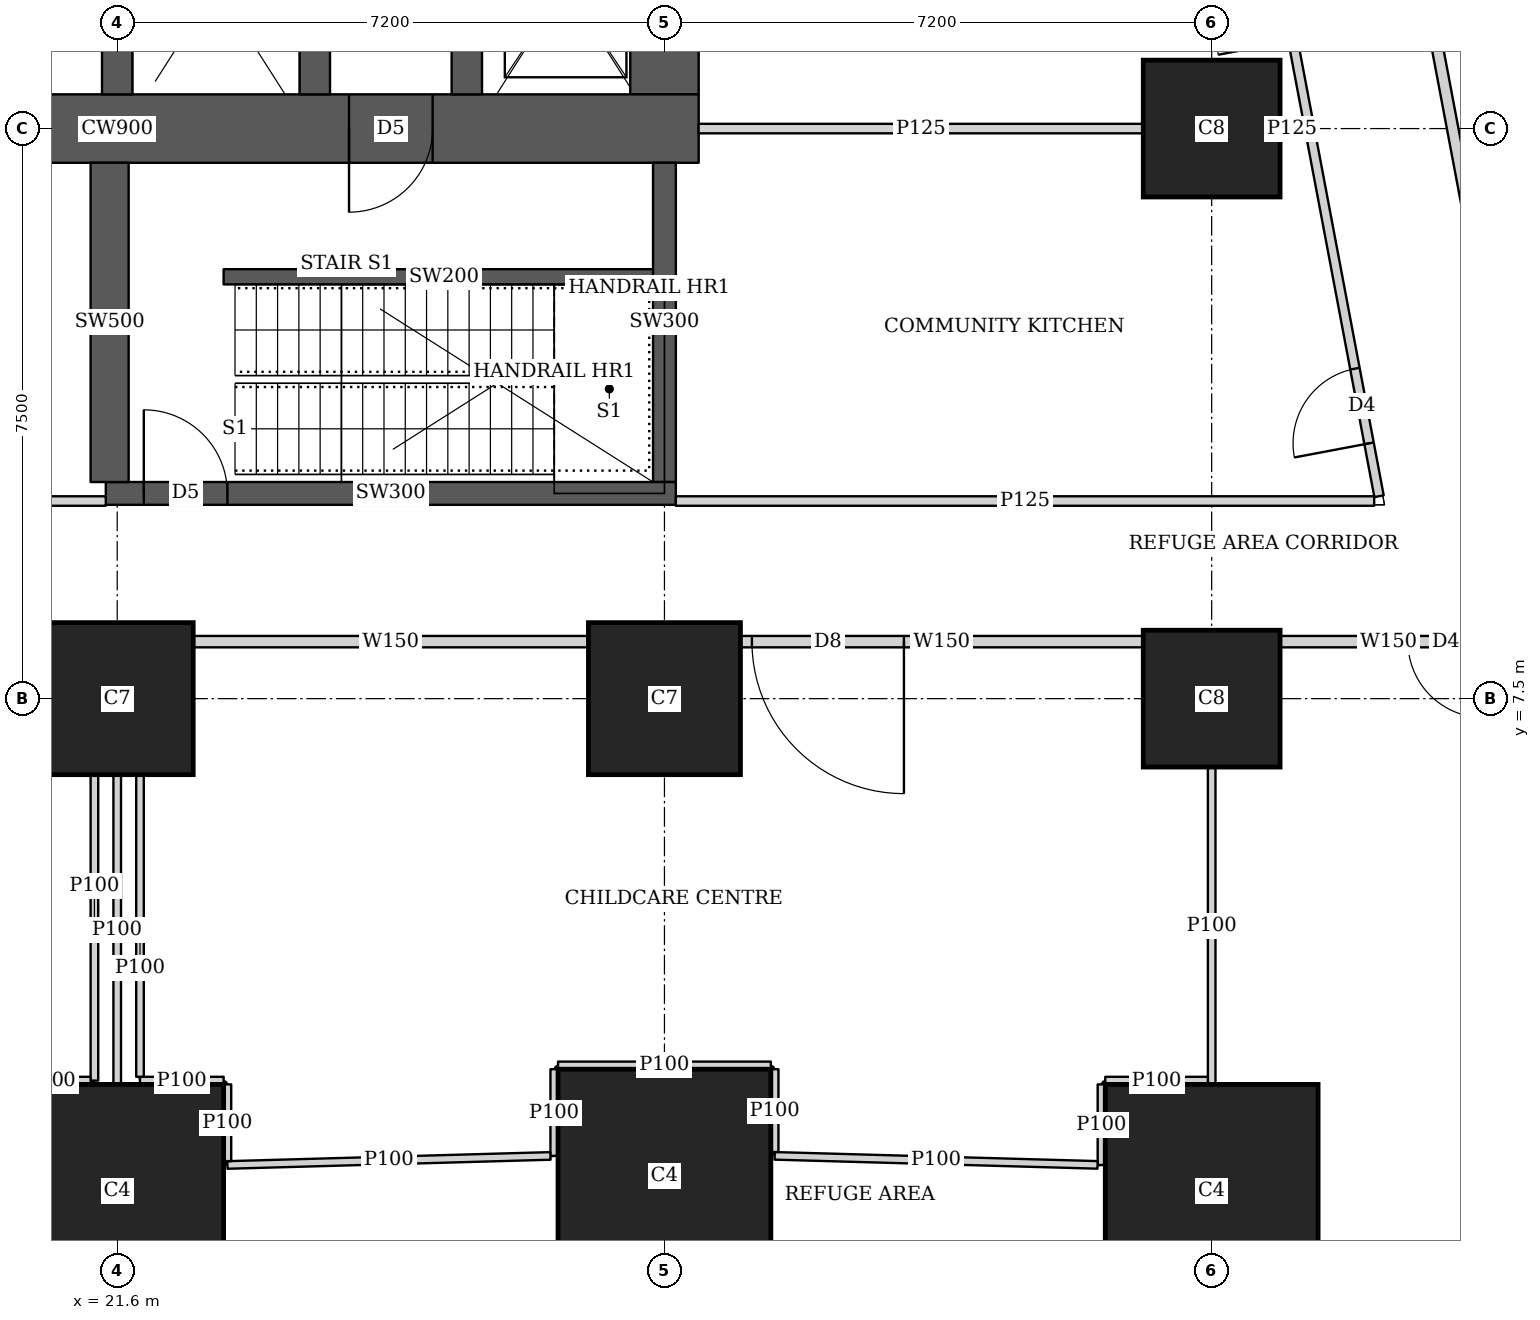
"""IFC4 building model, lengths in metres.
Left out: names, types, materials, properties, quantities, classifications, styles, units other than length and angle.
Written with IfcOpenShell. Run it as: python <this file> out.ifc"""

import sys

from ifc_helpers import new_model, si_unit, direction, frame, frame_2d, origin, origin_2d, place, context, subcontext, project, spatial, rectangle, extrude, element, fill, save


model = new_model("IFC4")
c1 = context("Model", 3, precision=1e-05, world=origin(), true_north=direction((0.0, 1.0)))
c2 = subcontext(c1, "Body", "Model", "MODEL_VIEW")
j1 = project(units=[si_unit("LENGTHUNIT", "METRE"), si_unit("PLANEANGLEUNIT", "RADIAN")], contexts=[c1])
p1 = place(None, origin())
s1 = spatial("IfcSite", under=j1, at=p1, CompositionType="ELEMENT")
p2 = place(p1, origin())
s2 = spatial("IfcBuilding", under=s1, at=p2, CompositionType="ELEMENT")
p3 = place(p2, frame((0.0, 0.0, 72.5)))
s3 = spatial("IfcBuildingStorey", under=s2, at=p3, CompositionType="ELEMENT", Elevation=72.5)
for number, where, z_axis, x_axis in (
    (1, (21.6, 1.025, 0.0), (0.0, 0.0, 1.0), (1.0, 0.0, 0.0)),
    (2, (28.8, 1.225, 0.0), (0.0, 0.0, 1.0), (1.0, 0.0, 0.0)),
    (3, (36.0, 1.025, 0.0), (0.0, 0.0, 1.0), (1.0, 0.0, 0.0)),
):
    element("IfcColumn", number, at=place(p3, frame(where, z_axis=z_axis, x_axis=x_axis)), inside=s3, PredefinedType="COLUMN", context=c2, shape_type="SweptSolid", body=[
        extrude(rectangle(XDim=2.8, YDim=2.8, at=origin_2d()), origin(), (0.0, 0.0, 1.0), 5.4),
    ])
for number, where, z_axis, x_axis in (
    (4, (21.6, 7.5, 0.0), (0.0, 0.0, 1.0), (1.0, 0.0, 0.0)),
    (5, (28.8, 7.5, 0.0), (0.0, 0.0, 1.0), (1.0, 0.0, 0.0)),
):
    element("IfcColumn", number, at=place(p3, frame(where, z_axis=z_axis, x_axis=x_axis)), inside=s3, PredefinedType="COLUMN", context=c2, shape_type="SweptSolid", body=[
        extrude(rectangle(XDim=2.0, YDim=2.0, at=origin_2d()), origin(), (0.0, 0.0, 1.0), 5.4),
    ])
for number, where, z_axis, x_axis in (
    (6, (36.0, 7.5, 0.0), (0.0, 0.0, 1.0), (1.0, 0.0, 0.0)),
    (7, (36.0, 15.0, 0.0), (0.0, 0.0, 1.0), (1.0, 0.0, 0.0)),
):
    element("IfcColumn", number, at=place(p3, frame(where, z_axis=z_axis, x_axis=x_axis)), inside=s3, PredefinedType="COLUMN", context=c2, shape_type="SweptSolid", body=[
        extrude(rectangle(XDim=1.8, YDim=1.8, at=origin_2d()), origin(), (0.0, 0.0, 1.0), 5.4),
    ])
p4 = place(p3, frame((13.95, 15.0, 0.0), z_axis=(0.0, 0.0, 1.0), x_axis=(1.0, 0.0, 0.0)))
e8 = element("IfcWall", 8, at=p4, inside=s3, PredefinedType="SHEAR", context=c2, shape_type="SweptSolid", body=[
    extrude(rectangle(XDim=15.3, YDim=0.9, at=frame_2d((7.65, 0.0))), origin(), (0.0, 0.0, 1.0), 5.4),
])
p5 = place(p4, frame((4.45, 0.0, 0.0)))
e9 = element("IfcOpeningElement", 9, at=p5, cuts=e8, PredefinedType="OPENING", context=c2, shape_type="SweptSolid", body=[
    extrude(rectangle(XDim=1.8, YDim=2.1, at=frame_2d((0.9, 1.05))), frame((0.0, 0.46, 0.0), z_axis=(0.0, -1.0, 0.0), x_axis=(1.0, 0.0, 0.0)), (0.0, 0.0, 1.0), 0.92),
])
p6 = place(p4, frame((10.7, 0.0, 0.0)))
e10 = element("IfcOpeningElement", 10, at=p6, cuts=e8, PredefinedType="OPENING", context=c2, shape_type="SweptSolid", body=[
    extrude(rectangle(XDim=1.1, YDim=2.1, at=frame_2d((0.55, 1.05))), frame((0.0, 0.46, 0.0), z_axis=(0.0, -1.0, 0.0), x_axis=(1.0, 0.0, 0.0)), (0.0, 0.0, 1.0), 0.92),
])
p7 = place(p3, frame((28.8, 15.45, 0.0), z_axis=(0.0, 0.0, 1.0), x_axis=(0.0, 1.0, 0.0)))
e11 = element("IfcWall", 11, at=p7, inside=s3, PredefinedType="SHEAR", context=c2, shape_type="SweptSolid", body=[
    extrude(rectangle(XDim=14.1, YDim=0.9, at=frame_2d((7.05, 0.0))), origin(), (0.0, 0.0, 1.0), 5.4),
])
for number, where, z_axis, x_axis in (
    (12, (21.6, 15.45, 0.0), (0.0, 0.0, 1.0), (0.0, 1.0, 0.0)),
    (13, (24.2, 15.45, 0.0), (0.0, 0.0, 1.0), (0.0, 1.0, 0.0)),
):
    element("IfcWall", number, at=place(p3, frame(where, z_axis=z_axis, x_axis=x_axis)), inside=s3, PredefinedType="SHEAR", context=c2, shape_type="SweptSolid", body=[
        extrude(rectangle(XDim=14.1, YDim=0.4, at=frame_2d((7.05, 0.0))), origin(), (0.0, 0.0, 1.0), 5.4),
    ])
p8 = place(p3, frame((26.2, 15.45, 0.0), z_axis=(0.0, 0.0, 1.0), x_axis=(0.0, 1.0, 0.0)))
e14 = element("IfcWall", 14, at=p8, inside=s3, PredefinedType="SHEAR", context=c2, shape_type="SweptSolid", body=[
    extrude(rectangle(XDim=3.1, YDim=0.4, at=frame_2d((1.55, 0.0))), origin(), (0.0, 0.0, 1.0), 5.4),
])
p9 = place(p8, frame((0.825, 0.0, 0.0)))
e15 = element("IfcOpeningElement", 15, at=p9, cuts=e14, PredefinedType="OPENING", context=c2, shape_type="SweptSolid", body=[
    extrude(rectangle(XDim=1.2, YDim=2.1, at=frame_2d((0.6, 1.05))), frame((0.0, 0.21, 0.0), z_axis=(0.0, -1.0, 0.0), x_axis=(1.0, 0.0, 0.0)), (0.0, 0.0, 1.0), 0.42),
])
p10 = place(p3, frame((21.45, 10.2, 0.0), z_axis=(0.0, 0.0, 1.0), x_axis=(1.0, 0.0, 0.0)))
e16 = element("IfcWall", 16, at=p10, inside=s3, PredefinedType="SHEAR", context=c2, shape_type="SweptSolid", body=[
    extrude(rectangle(XDim=7.5, YDim=0.3, at=frame_2d((3.75, 0.0))), origin(), (0.0, 0.0, 1.0), 5.4),
])
p11 = place(p10, frame((0.5, 0.0, 0.0)))
e17 = element("IfcOpeningElement", 17, at=p11, cuts=e16, PredefinedType="OPENING", context=c2, shape_type="SweptSolid", body=[
    extrude(rectangle(XDim=1.1, YDim=2.1, at=frame_2d((0.55, 1.05))), frame((0.0, 0.16, 0.0), z_axis=(0.0, -1.0, 0.0), x_axis=(1.0, 0.0, 0.0)), (0.0, 0.0, 1.0), 0.32),
])
p12 = place(p3, frame((21.5, 10.35, 0.0), z_axis=(0.0, 0.0, 1.0), x_axis=(0.0, 1.0, 0.0)))
e18 = element("IfcWall", 18, at=p12, inside=s3, PredefinedType="SHEAR", context=c2, shape_type="SweptSolid", body=[
    extrude(rectangle(XDim=4.2, YDim=0.5, at=frame_2d((2.1, 0.0))), origin(), (0.0, 0.0, 1.0), 5.4),
])
p13 = place(p3, frame((28.8, 10.35, 0.0), z_axis=(0.0, 0.0, 1.0), x_axis=(0.0, 1.0, 0.0)))
e19 = element("IfcWall", 19, at=p13, inside=s3, PredefinedType="SHEAR", context=c2, shape_type="SweptSolid", body=[
    extrude(rectangle(XDim=4.2, YDim=0.3, at=frame_2d((2.1, 0.0))), origin(), (0.0, 0.0, 1.0), 5.4),
])
p14 = place(p3, frame((40.355, 8.25, 0.0), z_axis=(0.0, 0.0, 1.0), x_axis=(-1.0, 0.0, 0.0)))
e20 = element("IfcWall", 20, at=p14, inside=s3, PredefinedType="SOLIDWALL", context=c2, shape_type="SweptSolid", body=[
    extrude(rectangle(XDim=3.454, YDim=0.15, at=frame_2d((1.727, 0.0))), origin(), (0.0, 0.0, 1.0), 3.55),
])
p15 = place(p14, frame((0.773, 0.0, 0.0)))
e21 = element("IfcOpeningElement", 21, at=p15, cuts=e20, PredefinedType="OPENING", context=c2, shape_type="SweptSolid", body=[
    extrude(rectangle(XDim=1.0, YDim=2.1, at=frame_2d((0.5, 1.05))), frame((0.0, 0.085, 0.0), z_axis=(0.0, -1.0, 0.0), x_axis=(1.0, 0.0, 0.0)), (0.0, 0.0, 1.0), 0.17),
])
p16 = place(p3, frame((35.099, 8.25, 0.0), z_axis=(0.0, 0.0, 1.0), x_axis=(-1.0, 0.0, 0.0)))
e22 = element("IfcWall", 22, at=p16, inside=s3, PredefinedType="SOLIDWALL", context=c2, shape_type="SweptSolid", body=[
    extrude(rectangle(XDim=5.298, YDim=0.15, at=frame_2d((2.649, 0.0))), origin(), (0.0, 0.0, 1.0), 3.15),
])
p17 = place(p16, frame((3.148, 0.0, 0.0)))
e23 = element("IfcOpeningElement", 23, at=p17, cuts=e22, PredefinedType="OPENING", context=c2, shape_type="SweptSolid", body=[
    extrude(rectangle(XDim=2.0, YDim=2.1, at=frame_2d((1.0, 1.05))), frame((0.0, 0.085, 0.0), z_axis=(0.0, -1.0, 0.0), x_axis=(1.0, 0.0, 0.0)), (0.0, 0.0, 1.0), 0.17),
])
p18 = place(p3, frame((27.799, 8.25, 0.0), z_axis=(0.0, 0.0, 1.0), x_axis=(-1.0, 0.0, 0.0)))
e24 = element("IfcWall", 24, at=p18, inside=s3, PredefinedType="SOLIDWALL", context=c2, shape_type="SweptSolid", body=[
    extrude(rectangle(XDim=5.198, YDim=0.15, at=frame_2d((2.599, 0.0))), origin(), (0.0, 0.0, 1.0), 3.15),
])
p19 = place(p3, frame((35.094, 36.585, 0.0), z_axis=(0.0, 0.0, 1.0), x_axis=(0.185591455861, -0.982626995106, 0.0)))
e25 = element("IfcWall", 25, at=p19, inside=s3, PredefinedType="SOLIDWALL", context=c2, shape_type="SweptSolid", body=[
    extrude(rectangle(XDim=35.735, YDim=0.15, at=frame_2d((17.867, 0.0))), origin(), (0.0, 0.0, 1.0), 3.35),
])
p20 = place(p19, frame((15.15, 0.0, 0.0)))
e26 = element("IfcOpeningElement", 26, at=p20, cuts=e25, PredefinedType="OPENING", context=c2, shape_type="SweptSolid", body=[
    extrude(rectangle(XDim=1.0, YDim=2.1, at=frame_2d((0.5, 1.05))), frame((0.0, 0.085, 0.0), z_axis=(0.0, -1.0, 0.0), x_axis=(1.0, 0.0, 0.0)), (0.0, 0.0, 1.0), 0.17),
])
p21 = place(p3, frame((21.6, 2.426, 0.0), z_axis=(0.0, 0.0, 1.0), x_axis=(0.0, 1.0, 0.0)))
e27 = element("IfcWall", 27, at=p21, inside=s3, PredefinedType="PARTITIONING", context=c2, shape_type="SweptSolid", body=[
    extrude(rectangle(XDim=4.073, YDim=0.1, at=frame_2d((2.037, 0.0))), origin(), (0.0, 0.0, 1.0), 3.55),
])
p22 = place(p3, frame((36.0, 2.426, 0.0), z_axis=(0.0, 0.0, 1.0), x_axis=(0.0, 1.0, 0.0)))
e28 = element("IfcWall", 28, at=p22, inside=s3, PredefinedType="PARTITIONING", context=c2, shape_type="SweptSolid", body=[
    extrude(rectangle(XDim=4.173, YDim=0.1, at=frame_2d((2.086, 0.0))), origin(), (0.0, 0.0, 1.0), 3.55),
])
p23 = place(p3, frame((10.163, 10.1, 0.0), z_axis=(0.0, 0.0, 1.0), x_axis=(1.0, 0.0, 0.0)))
e29 = element("IfcWall", 29, at=p23, inside=s3, PredefinedType="PARTITIONING", context=c2, shape_type="SweptSolid", body=[
    extrude(rectangle(XDim=11.287, YDim=0.125, at=frame_2d((5.644, 0.0))), origin(), (0.0, 0.0, 1.0), 3.15),
])
p24 = place(p23, frame((7.832, 0.0, 0.0)))
e30 = element("IfcOpeningElement", 30, at=p24, cuts=e29, PredefinedType="OPENING", context=c2, shape_type="SweptSolid", body=[
    extrude(rectangle(XDim=1.8, YDim=2.1, at=frame_2d((0.9, 1.05))), frame((0.0, 0.073, 0.0), z_axis=(0.0, -1.0, 0.0), x_axis=(1.0, 0.0, 0.0)), (0.0, 0.0, 1.0), 0.145),
])
p25 = place(p3, frame((28.95, 10.1, 0.0), z_axis=(0.0, 0.0, 1.0), x_axis=(1.0, 0.0, 0.0)))
e31 = element("IfcWall", 31, at=p25, inside=s3, PredefinedType="PARTITIONING", context=c2, shape_type="SweptSolid", body=[
    extrude(rectangle(XDim=9.188, YDim=0.125, at=frame_2d((4.594, 0.0))), origin(), (0.0, 0.0, 1.0), 3.15),
])
p26 = place(p3, frame((38.202, 10.163, 0.0), z_axis=(0.0, 0.0, 1.0), x_axis=(-0.185610321132, 0.982623431783, 0.0)))
e32 = element("IfcWall", 32, at=p26, inside=s3, PredefinedType="PARTITIONING", context=c2, shape_type="SweptSolid", body=[
    extrude(rectangle(XDim=25.111, YDim=0.125, at=frame_2d((12.556, 0.0))), origin(), (0.0, 0.0, 1.0), 3.55),
])
p27 = place(p26, frame((0.708, 0.0, 0.0)))
e33 = element("IfcOpeningElement", 33, at=p27, cuts=e32, PredefinedType="OPENING", context=c2, shape_type="SweptSolid", body=[
    extrude(rectangle(XDim=1.0, YDim=2.1, at=frame_2d((0.5, 1.05))), frame((0.0, 0.073, 0.0), z_axis=(0.0, -1.0, 0.0), x_axis=(1.0, 0.0, 0.0)), (0.0, 0.0, 1.0), 0.145),
])
p28 = place(p26, frame((6.1, 0.0, 0.0)))
e34 = element("IfcOpeningElement", 34, at=p28, cuts=e32, PredefinedType="OPENING", context=c2, shape_type="SweptSolid", body=[
    extrude(rectangle(XDim=1.0, YDim=2.1, at=frame_2d((0.5, 1.05))), frame((0.0, 0.073, 0.0), z_axis=(0.0, -1.0, 0.0), x_axis=(1.0, 0.0, 0.0)), (0.0, 0.0, 1.0), 0.145),
])
p29 = place(p26, frame((13.378, 0.0, 0.0)))
e35 = element("IfcOpeningElement", 35, at=p29, cuts=e32, PredefinedType="OPENING", context=c2, shape_type="SweptSolid", body=[
    extrude(rectangle(XDim=1.0, YDim=2.1, at=frame_2d((0.5, 1.05))), frame((0.0, 0.073, 0.0), z_axis=(0.0, -1.0, 0.0), x_axis=(1.0, 0.0, 0.0)), (0.0, 0.0, 1.0), 0.145),
])
p30 = place(p26, frame((21.35, 0.0, 0.0)))
e36 = element("IfcOpeningElement", 36, at=p30, cuts=e32, PredefinedType="OPENING", context=c2, shape_type="SweptSolid", body=[
    extrude(rectangle(XDim=1.0, YDim=2.1, at=frame_2d((0.5, 1.05))), frame((0.0, 0.073, 0.0), z_axis=(0.0, -1.0, 0.0), x_axis=(1.0, 0.0, 0.0)), (0.0, 0.0, 1.0), 0.145),
])
p31 = place(p3, frame((29.25, 15.0, 0.0), z_axis=(0.0, 0.0, 1.0), x_axis=(1.0, 0.0, 0.0)))
e37 = element("IfcWall", 37, at=p31, inside=s3, PredefinedType="PARTITIONING", context=c2, shape_type="SweptSolid", body=[
    extrude(rectangle(XDim=5.849, YDim=0.125, at=frame_2d((2.925, 0.0))), origin(), (0.0, 0.0, 1.0), 3.55),
])
p32 = place(p3, frame((36.901, 15.0, 0.0), z_axis=(0.0, 0.0, 1.0), x_axis=(1.0, 0.0, 0.0)))
e38 = element("IfcWall", 38, at=p32, inside=s3, PredefinedType="PARTITIONING", context=c2, shape_type="SweptSolid", body=[
    extrude(rectangle(XDim=0.312, YDim=0.125, at=frame_2d((0.156, 0.0))), origin(), (0.0, 0.0, 1.0), 3.55),
])
p33 = place(p3, frame((21.3, 6.499, 0.0), z_axis=(0.0, 0.0, 1.0), x_axis=(0.0, -1.0, 0.0)))
e39 = element("IfcWall", 39, at=p33, inside=s3, PredefinedType="PARTITIONING", context=c2, shape_type="SweptSolid", body=[
    extrude(rectangle(XDim=4.024, YDim=0.1, at=frame_2d((2.012, 0.0))), origin(), (0.0, 0.0, 1.0), 3.55),
])
p34 = place(p3, frame((21.25, 2.475, 0.0), z_axis=(0.0, 0.0, 1.0), x_axis=(-1.0, 0.0, 0.0)))
e40 = element("IfcWall", 40, at=p34, inside=s3, PredefinedType="PARTITIONING", context=c2, shape_type="SweptSolid", body=[
    extrude(rectangle(XDim=1.05, YDim=0.1, at=frame_2d((0.525, 0.0))), origin(), (0.0, 0.0, 1.0), 3.55),
])
p35 = place(p3, frame((35.95, 2.475, 0.0), z_axis=(0.0, 0.0, 1.0), x_axis=(-1.0, 0.0, 0.0)))
e41 = element("IfcWall", 41, at=p35, inside=s3, PredefinedType="PARTITIONING", context=c2, shape_type="SweptSolid", body=[
    extrude(rectangle(XDim=1.35, YDim=0.1, at=frame_2d((0.675, 0.0))), origin(), (0.0, 0.0, 1.0), 3.55),
])
p36 = place(p3, frame((34.55, 2.425, 0.0), z_axis=(0.0, 0.0, 1.0), x_axis=(0.0, -1.0, 0.0)))
e42 = element("IfcWall", 42, at=p36, inside=s3, PredefinedType="PARTITIONING", context=c2, shape_type="SweptSolid", body=[
    extrude(rectangle(XDim=1.06, YDim=0.1, at=frame_2d((0.53, 0.0))), origin(), (0.0, 0.0, 1.0), 3.35),
])
p37 = place(p3, frame((34.499, 1.366, 0.0), z_axis=(0.0, 0.0, 1.0), x_axis=(-0.999607123995, 0.028028515083, 0.0)))
e43 = element("IfcWall", 43, at=p37, inside=s3, PredefinedType="PARTITIONING", context=c2, shape_type="SweptSolid", body=[
    extrude(rectangle(XDim=4.251, YDim=0.1, at=frame_2d((2.125, 0.0))), origin(), (0.0, 0.0, 1.0), 3.35),
])
p38 = place(p3, frame((30.25, 1.535, 0.0), z_axis=(0.0, 0.0, 1.0), x_axis=(0.0, 1.0, 0.0)))
e44 = element("IfcWall", 44, at=p38, inside=s3, PredefinedType="PARTITIONING", context=c2, shape_type="SweptSolid", body=[
    extrude(rectangle(XDim=1.09, YDim=0.1, at=frame_2d((0.545, 0.0))), origin(), (0.0, 0.0, 1.0), 3.35),
])
p39 = place(p3, frame((30.2, 2.675, 0.0), z_axis=(0.0, 0.0, 1.0), x_axis=(-1.0, 0.0, 0.0)))
e45 = element("IfcWall", 45, at=p39, inside=s3, PredefinedType="PARTITIONING", context=c2, shape_type="SweptSolid", body=[
    extrude(rectangle(XDim=2.8, YDim=0.1, at=frame_2d((1.4, 0.0))), origin(), (0.0, 0.0, 1.0), 3.55),
])
p40 = place(p3, frame((27.35, 2.625, 0.0), z_axis=(0.0, 0.0, 1.0), x_axis=(0.0, -1.0, 0.0)))
e46 = element("IfcWall", 46, at=p40, inside=s3, PredefinedType="PARTITIONING", context=c2, shape_type="SweptSolid", body=[
    extrude(rectangle(XDim=1.14, YDim=0.1, at=frame_2d((0.57, 0.0))), origin(), (0.0, 0.0, 1.0), 3.35),
])
p41 = place(p3, frame((27.3, 1.484, 0.0), z_axis=(0.0, 0.0, 1.0), x_axis=(-0.999608911234, -0.027964702423, 0.0)))
e47 = element("IfcWall", 47, at=p41, inside=s3, PredefinedType="PARTITIONING", context=c2, shape_type="SweptSolid", body=[
    extrude(rectangle(XDim=4.252, YDim=0.1, at=frame_2d((2.126, 0.0))), origin(), (0.0, 0.0, 1.0), 3.35),
])
p42 = place(p3, frame((23.05, 1.416, 0.0), z_axis=(0.0, 0.0, 1.0), x_axis=(0.0, 1.0, 0.0)))
e48 = element("IfcWall", 48, at=p42, inside=s3, PredefinedType="PARTITIONING", context=c2, shape_type="SweptSolid", body=[
    extrude(rectangle(XDim=1.009, YDim=0.1, at=frame_2d((0.504, 0.0))), origin(), (0.0, 0.0, 1.0), 3.35),
])
p43 = place(p3, frame((23.0, 2.475, 0.0), z_axis=(0.0, 0.0, 1.0), x_axis=(-1.0, 0.0, 0.0)))
e49 = element("IfcWall", 49, at=p43, inside=s3, PredefinedType="PARTITIONING", context=c2, shape_type="SweptSolid", body=[
    extrude(rectangle(XDim=1.1, YDim=0.1, at=frame_2d((0.55, 0.0))), origin(), (0.0, 0.0, 1.0), 3.55),
])
p44 = place(p3, frame((21.9, 2.525, 0.0), z_axis=(0.0, 0.0, 1.0), x_axis=(0.0, 1.0, 0.0)))
e50 = element("IfcWall", 50, at=p44, inside=s3, PredefinedType="PARTITIONING", context=c2, shape_type="SweptSolid", body=[
    extrude(rectangle(XDim=3.974, YDim=0.1, at=frame_2d((1.987, 0.0))), origin(), (0.0, 0.0, 1.0), 3.55),
])
p45 = place(p3, frame((23.0, 13.05, 0.0), z_axis=(0.0, 0.0, 1.0), x_axis=(1.0, 0.0, 0.0)))
e51 = element("IfcWall", 51, at=p45, inside=s3, PredefinedType="SHEAR", context=c2, shape_type="SweptSolid", body=[
    extrude(rectangle(XDim=5.8, YDim=0.2, at=frame_2d((2.9, 0.0))), origin(), (0.0, 0.0, 1.0), 5.4),
])
p46 = place(p17, origin())
e52 = element("IfcDoor", 52, at=p46, inside=s3, OperationType="DOUBLE_DOOR_SINGLE_SWING", PredefinedType="DOOR", context=c2, shape_type="SweptSolid", body=[
    extrude(rectangle(XDim=2.0, YDim=2.1, at=frame_2d((1.0, 1.05))), frame((0.0, 0.025, 0.0), z_axis=(0.0, -1.0, 0.0), x_axis=(1.0, 0.0, 0.0)), (0.0, 0.0, 1.0), 0.05),
])
fill(e23, e52)
p47 = place(p15, origin())
e53 = element("IfcDoor", 53, at=p47, inside=s3, OperationType="SINGLE_SWING_LEFT", PredefinedType="DOOR", context=c2, shape_type="SweptSolid", body=[
    extrude(rectangle(XDim=1.0, YDim=2.1, at=frame_2d((0.5, 1.05))), frame((0.0, 0.025, 0.0), z_axis=(0.0, -1.0, 0.0), x_axis=(1.0, 0.0, 0.0)), (0.0, 0.0, 1.0), 0.05),
])
fill(e21, e53)
p48 = place(p27, origin())
e54 = element("IfcDoor", 54, at=p48, inside=s3, OperationType="SINGLE_SWING_LEFT", PredefinedType="DOOR", context=c2, shape_type="SweptSolid", body=[
    extrude(rectangle(XDim=1.0, YDim=2.1, at=frame_2d((0.5, 1.05))), frame((0.0, 0.025, 0.0), z_axis=(0.0, -1.0, 0.0), x_axis=(1.0, 0.0, 0.0)), (0.0, 0.0, 1.0), 0.05),
])
fill(e33, e54)
p49 = place(p6, origin())
e55 = element("IfcDoor", 55, at=p49, inside=s3, OperationType="SINGLE_SWING_RIGHT", PredefinedType="DOOR", context=c2, shape_type="SweptSolid", body=[
    extrude(rectangle(XDim=1.1, YDim=2.1, at=frame_2d((0.55, 1.05))), frame((0.0, 0.025, 0.0), z_axis=(0.0, -1.0, 0.0), x_axis=(1.0, 0.0, 0.0)), (0.0, 0.0, 1.0), 0.05),
])
fill(e10, e55)
p50 = place(p11, origin())
e56 = element("IfcDoor", 56, at=p50, inside=s3, OperationType="SINGLE_SWING_LEFT", PredefinedType="DOOR", context=c2, shape_type="SweptSolid", body=[
    extrude(rectangle(XDim=1.1, YDim=2.1, at=frame_2d((0.55, 1.05))), frame((0.0, 0.025, 0.0), z_axis=(0.0, -1.0, 0.0), x_axis=(1.0, 0.0, 0.0)), (0.0, 0.0, 1.0), 0.05),
])
fill(e17, e56)
save(model, sys.argv[1])
